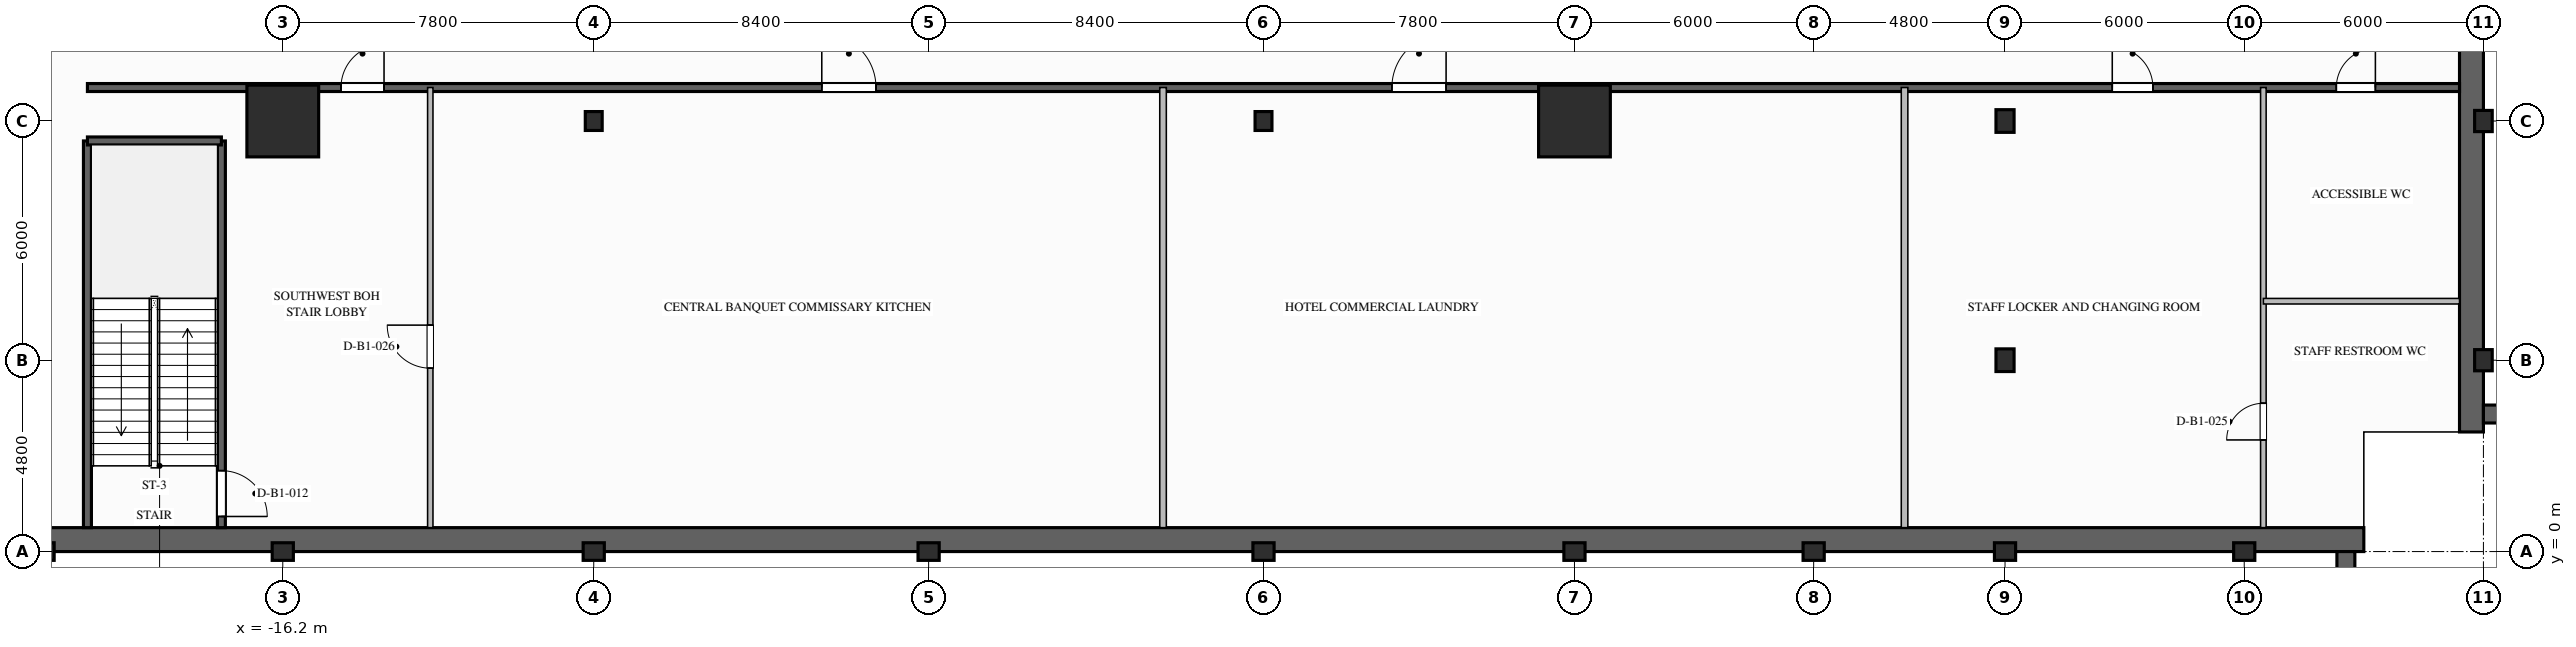
"""IFC4 building model, lengths in metres.
Left out: names, types, materials, properties, quantities, classifications, styles, units other than length and angle.
Written with IfcOpenShell. Run it as: python <this file> out.ifc"""

import sys

from ifc_helpers import new_model, si_unit, direction, frame, frame_2d, origin, origin_2d, place, context, subcontext, project, spatial, rectangle, i_section, extrude, element, fill, save


model = new_model("IFC4")
c1 = context("Model", 3, precision=1e-05, world=origin(), true_north=direction((0.0, 1.0)))
c2 = subcontext(c1, "Body", "Model", "MODEL_VIEW")
j1 = project(units=[si_unit("LENGTHUNIT", "METRE"), si_unit("PLANEANGLEUNIT", "RADIAN")], contexts=[c1])
p1 = place(None, origin())
s1 = spatial("IfcSite", under=j1, at=p1, CompositionType="ELEMENT")
p2 = place(p1, origin())
s2 = spatial("IfcBuilding", under=s1, at=p2, CompositionType="ELEMENT")
p3 = place(p2, frame((0.0, 0.0, -5.4)))
s3 = spatial("IfcBuildingStorey", under=s2, at=p3, CompositionType="ELEMENT", Elevation=-5.4)
p4 = place(p3, frame((38.7, 51.0, 0.0), z_axis=(0.0, 0.0, 1.0), x_axis=(0.0, -1.0, 0.0)))
e1 = element("IfcWall", 1, at=p4, inside=s3, PredefinedType="USERDEFINED", context=c2, shape_type="SweptSolid", body=[
    extrude(rectangle(XDim=48.0, YDim=0.6, at=frame_2d((24.0, 0.0))), origin(), (0.0, 0.0, 1.0), 5.05),
])
p5 = place(p3, frame((36.0, 0.3, 0.0), z_axis=(0.0, 0.0, 1.0), x_axis=(-1.0, 0.0, 0.0)))
e2 = element("IfcWall", 2, at=p5, inside=s3, PredefinedType="USERDEFINED", context=c2, shape_type="SweptSolid", body=[
    extrude(rectangle(XDim=60.0, YDim=0.6, at=frame_2d((30.0, 0.0))), origin(), (0.0, 0.0, 1.0), 5.05),
])
for number, where, z_axis, x_axis in (
    (3, (-16.2, 10.8, 0.0), (0.0, 0.0, 1.0), (1.0, 0.0, 0.0)),
    (4, (16.2, 10.8, 0.0), (0.0, 0.0, 1.0), (1.0, 0.0, 0.0)),
):
    element("IfcColumn", number, at=place(p3, frame(where, z_axis=z_axis, x_axis=x_axis)), inside=s3, PredefinedType="COLUMN", context=c2, shape_type="SweptSolid", body=[
        extrude(rectangle(XDim=1.8, YDim=1.8, at=origin_2d()), origin(), (0.0, 0.0, 1.0), 5.4),
    ])
for number, where, z_axis, x_axis in (
    (5, (39.0, 4.8, 0.0), (0.0, 0.0, 1.0), (1.0, 0.0, 0.0)),
    (6, (39.0, 10.8, 0.0), (0.0, 0.0, 1.0), (1.0, 0.0, 0.0)),
    (7, (-22.2, 0.0, 0.0), (0.0, 0.0, 1.0), (0.0, 1.0, 0.0)),
    (8, (-16.2, 0.0, 0.0), (0.0, 0.0, 1.0), (0.0, 1.0, 0.0)),
    (9, (-8.4, 0.0, 0.0), (0.0, 0.0, 1.0), (0.0, 1.0, 0.0)),
    (10, (0.0, 0.0, 0.0), (0.0, 0.0, 1.0), (0.0, 1.0, 0.0)),
    (11, (8.4, 0.0, 0.0), (0.0, 0.0, 1.0), (0.0, 1.0, 0.0)),
    (12, (16.2, 0.0, 0.0), (0.0, 0.0, 1.0), (0.0, 1.0, 0.0)),
    (13, (22.2, 0.0, 0.0), (0.0, 0.0, 1.0), (0.0, 1.0, 0.0)),
    (14, (27.0, 0.0, 0.0), (0.0, 0.0, 1.0), (0.0, 1.0, 0.0)),
    (15, (33.0, 0.0, 0.0), (0.0, 0.0, 1.0), (0.0, 1.0, 0.0)),
):
    element("IfcColumn", number, at=place(p3, frame(where, z_axis=z_axis, x_axis=x_axis)), inside=s3, PredefinedType="COLUMN", context=c2, shape_type="SweptSolid", body=[
        extrude(i_section(OverallWidth=0.442, OverallDepth=0.531, WebThickness=0.066, FlangeThickness=0.106, FilletRadius=0.03, at=origin_2d()), origin(), (0.0, 0.0, 1.0), 5.4),
    ])
for number, where, z_axis, x_axis in (
    (16, (27.0, 4.8, 0.0), (0.0, 0.0, 1.0), (1.0, 0.0, 0.0)),
    (17, (27.0, 10.8, 0.0), (0.0, 0.0, 1.0), (1.0, 0.0, 0.0)),
):
    element("IfcColumn", number, at=place(p3, frame(where, z_axis=z_axis, x_axis=x_axis)), inside=s3, PredefinedType="COLUMN", context=c2, shape_type="SweptSolid", body=[
        extrude(i_section(OverallWidth=0.454, OverallDepth=0.569, WebThickness=0.078, FlangeThickness=0.125, FilletRadius=0.03, at=origin_2d()), origin(), (0.0, 0.0, 1.0), 5.4),
    ])
for number, where, z_axis, x_axis in (
    (18, (-8.4, 10.8, 0.0), (0.0, 0.0, 1.0), (1.0, 0.0, 0.0)),
    (19, (8.4, 10.8, 0.0), (0.0, 0.0, 1.0), (1.0, 0.0, 0.0)),
):
    element("IfcColumn", number, at=place(p3, frame(where, z_axis=z_axis, x_axis=x_axis)), inside=s3, PredefinedType="COLUMN", context=c2, shape_type="SweptSolid", body=[
        extrude(i_section(OverallWidth=0.424, OverallDepth=0.474, WebThickness=0.048, FlangeThickness=0.077, FilletRadius=0.03, at=origin_2d()), origin(), (0.0, 0.0, 1.0), 5.4),
    ])
p6 = place(p3, frame((39.0, 3.45, -5.4), z_axis=(0.0, 0.0, 1.0), x_axis=(1.0, 0.0, 0.0)))
e20 = element("IfcWall", 20, at=p6, inside=s3, PredefinedType="USERDEFINED", context=c2, shape_type="SweptSolid", body=[
    extrude(rectangle(XDim=5.825, YDim=0.45, at=frame_2d((2.913, 0.0))), origin(), (0.0, 0.0, 1.0), 10.62),
])
p7 = place(p3, frame((35.55, -2.325, -5.4), z_axis=(0.0, 0.0, 1.0), x_axis=(0.0, 1.0, 0.0)))
e21 = element("IfcWall", 21, at=p7, inside=s3, PredefinedType="USERDEFINED", context=c2, shape_type="SweptSolid", body=[
    extrude(rectangle(XDim=2.325, YDim=0.45, at=frame_2d((1.163, 0.0))), origin(), (0.0, 0.0, 1.0), 10.62),
])
p8 = place(p3, frame((-21.1, 0.6, 0.0), z_axis=(0.0, 0.0, 1.0), x_axis=(0.0, 1.0, 0.0)))
e22 = element("IfcWall", 22, at=p8, inside=s3, PredefinedType="SOLIDWALL", context=c2, shape_type="SweptSolid", body=[
    extrude(rectangle(XDim=9.7, YDim=0.2, at=frame_2d((4.85, 0.0))), origin(), (0.0, 0.0, 1.0), 5.05),
])
p9 = place(p3, frame((-17.74, 10.3, 0.0), z_axis=(0.0, 0.0, 1.0), x_axis=(0.0, -1.0, 0.0)))
e23 = element("IfcWall", 23, at=p9, inside=s3, PredefinedType="SOLIDWALL", context=c2, shape_type="SweptSolid", body=[
    extrude(rectangle(XDim=9.7, YDim=0.2, at=frame_2d((4.85, 0.0))), origin(), (0.0, 0.0, 1.0), 5.05),
])
p10 = place(p9, frame((8.27, 0.0, 0.0)))
e24 = element("IfcOpeningElement", 24, at=p10, cuts=e23, PredefinedType="OPENING", context=c2, shape_type="SweptSolid", body=[
    extrude(rectangle(XDim=1.15, YDim=2.15, at=frame_2d((0.575, 1.075))), frame((0.0, 0.11, 0.0), z_axis=(0.0, -1.0, 0.0), x_axis=(1.0, 0.0, 0.0)), (0.0, 0.0, 1.0), 0.22),
])
p11 = place(p3, frame((-17.74, 10.3, 0.0), z_axis=(0.0, 0.0, 1.0), x_axis=(-1.0, 0.0, 0.0)))
e25 = element("IfcWall", 25, at=p11, inside=s3, PredefinedType="SOLIDWALL", context=c2, shape_type="SweptSolid", body=[
    extrude(rectangle(XDim=3.36, YDim=0.2, at=frame_2d((1.68, 0.0))), origin(), (0.0, 0.0, 1.0), 5.05),
])
p12 = place(p3, frame((-21.1, 11.64, 0.0), z_axis=(0.0, 0.0, 1.0), x_axis=(1.0, 0.0, 0.0)))
e26 = element("IfcWall", 26, at=p12, inside=s3, PredefinedType="SOLIDWALL", context=c2, shape_type="SweptSolid", body=[
    extrude(rectangle(XDim=59.5, YDim=0.2, at=frame_2d((29.75, 0.0))), origin(), (0.0, 0.0, 1.0), 5.05),
])
p13 = place(p12, frame((6.36, 0.0, 0.0)))
e27 = element("IfcOpeningElement", 27, at=p13, cuts=e26, PredefinedType="OPENING", context=c2, shape_type="SweptSolid", body=[
    extrude(rectangle(XDim=1.08, YDim=2.04, at=frame_2d((0.54, 1.02))), frame((0.0, 0.11, 0.0), z_axis=(0.0, -1.0, 0.0), x_axis=(1.0, 0.0, 0.0)), (0.0, 0.0, 1.0), 0.22),
])
p14 = place(p12, frame((18.42, 0.0, 0.0)))
e28 = element("IfcOpeningElement", 28, at=p14, cuts=e26, PredefinedType="OPENING", context=c2, shape_type="SweptSolid", body=[
    extrude(rectangle(XDim=1.36, YDim=2.2, at=frame_2d((0.68, 1.1))), frame((0.0, 0.11, 0.0), z_axis=(0.0, -1.0, 0.0), x_axis=(1.0, 0.0, 0.0)), (0.0, 0.0, 1.0), 0.22),
])
p15 = place(p12, frame((32.72, 0.0, 0.0)))
e29 = element("IfcOpeningElement", 29, at=p15, cuts=e26, PredefinedType="OPENING", context=c2, shape_type="SweptSolid", body=[
    extrude(rectangle(XDim=1.36, YDim=2.2, at=frame_2d((0.68, 1.1))), frame((0.0, 0.11, 0.0), z_axis=(0.0, -1.0, 0.0), x_axis=(1.0, 0.0, 0.0)), (0.0, 0.0, 1.0), 0.22),
])
p16 = place(p12, frame((50.79, 0.0, 0.0)))
e30 = element("IfcOpeningElement", 30, at=p16, cuts=e26, PredefinedType="OPENING", context=c2, shape_type="SweptSolid", body=[
    extrude(rectangle(XDim=1.02, YDim=2.15, at=frame_2d((0.51, 1.075))), frame((0.0, 0.11, 0.0), z_axis=(0.0, -1.0, 0.0), x_axis=(1.0, 0.0, 0.0)), (0.0, 0.0, 1.0), 0.22),
])
p17 = place(p12, frame((56.41, 0.0, 0.0)))
e31 = element("IfcOpeningElement", 31, at=p17, cuts=e26, PredefinedType="OPENING", context=c2, shape_type="SweptSolid", body=[
    extrude(rectangle(XDim=0.98, YDim=2.1, at=frame_2d((0.49, 1.05))), frame((0.0, 0.11, 0.0), z_axis=(0.0, -1.0, 0.0), x_axis=(1.0, 0.0, 0.0)), (0.0, 0.0, 1.0), 0.22),
])
p18 = place(p3, frame((-12.5, 0.6, 0.0), z_axis=(0.0, 0.0, 1.0), x_axis=(0.0, 1.0, 0.0)))
e32 = element("IfcWall", 32, at=p18, inside=s3, PredefinedType="PARTITIONING", context=c2, shape_type="SweptSolid", body=[
    extrude(rectangle(XDim=11.04, YDim=0.135, at=frame_2d((5.52, 0.0))), origin(), (0.0, 0.0, 1.0), 5.05),
])
p19 = place(p18, frame((4.0, 0.0, 0.0)))
e33 = element("IfcOpeningElement", 33, at=p19, cuts=e32, PredefinedType="OPENING", context=c2, shape_type="SweptSolid", body=[
    extrude(rectangle(XDim=1.08, YDim=2.04, at=frame_2d((0.54, 1.02))), frame((0.0, 0.077, 0.0), z_axis=(0.0, -1.0, 0.0), x_axis=(1.0, 0.0, 0.0)), (0.0, 0.0, 1.0), 0.155),
])
for number, where, z_axis, x_axis in (
    (34, (5.88, 0.6, 0.0), (0.0, 0.0, 1.0), (0.0, 1.0, 0.0)),
    (35, (24.48, 0.6, 0.0), (0.0, 0.0, 1.0), (0.0, 1.0, 0.0)),
):
    element("IfcWall", number, at=place(p3, frame(where, z_axis=z_axis, x_axis=x_axis)), inside=s3, PredefinedType="PARTITIONING", context=c2, shape_type="SweptSolid", body=[
        extrude(rectangle(XDim=11.04, YDim=0.165, at=frame_2d((5.52, 0.0))), origin(), (0.0, 0.0, 1.0), 5.05),
    ])
p20 = place(p3, frame((33.48, 0.6, 0.0), z_axis=(0.0, 0.0, 1.0), x_axis=(0.0, 1.0, 0.0)))
e36 = element("IfcWall", 36, at=p20, inside=s3, PredefinedType="PLUMBINGWALL", context=c2, shape_type="SweptSolid", body=[
    extrude(rectangle(XDim=11.04, YDim=0.14, at=frame_2d((5.52, 0.0))), origin(), (0.0, 0.0, 1.0), 5.05),
])
p21 = place(p20, frame((2.2, 0.0, 0.0)))
e37 = element("IfcOpeningElement", 37, at=p21, cuts=e36, PredefinedType="OPENING", context=c2, shape_type="SweptSolid", body=[
    extrude(rectangle(XDim=0.92, YDim=2.1, at=frame_2d((0.46, 1.05))), frame((0.0, 0.08, 0.0), z_axis=(0.0, -1.0, 0.0), x_axis=(1.0, 0.0, 0.0)), (0.0, 0.0, 1.0), 0.16),
])
p22 = place(p3, frame((33.48, 6.28, 0.0), z_axis=(0.0, 0.0, 1.0), x_axis=(1.0, 0.0, 0.0)))
e38 = element("IfcWall", 38, at=p22, inside=s3, PredefinedType="PLUMBINGWALL", context=c2, shape_type="SweptSolid", body=[
    extrude(rectangle(XDim=4.92, YDim=0.14, at=frame_2d((2.46, 0.0))), origin(), (0.0, 0.0, 1.0), 5.05),
])
p23 = place(p10, origin())
e39 = element("IfcDoor", 39, at=p23, inside=s3, OperationType="SINGLE_SWING_RIGHT", PredefinedType="DOOR", context=c2, shape_type="SweptSolid", body=[
    extrude(rectangle(XDim=1.15, YDim=2.15, at=frame_2d((0.575, 1.075))), frame((0.0, 0.025, 0.0), z_axis=(0.0, -1.0, 0.0), x_axis=(1.0, 0.0, 0.0)), (0.0, 0.0, 1.0), 0.05),
])
fill(e24, e39)
p24 = place(p13, origin())
e40 = element("IfcDoor", 40, at=p24, inside=s3, OperationType="SINGLE_SWING_RIGHT", PredefinedType="DOOR", context=c2, shape_type="SweptSolid", body=[
    extrude(rectangle(XDim=1.08, YDim=2.04, at=frame_2d((0.54, 1.02))), frame((0.0, 0.025, 0.0), z_axis=(0.0, -1.0, 0.0), x_axis=(1.0, 0.0, 0.0)), (0.0, 0.0, 1.0), 0.05),
])
fill(e27, e40)
p25 = place(p14, origin())
e41 = element("IfcDoor", 41, at=p25, inside=s3, OperationType="SINGLE_SWING_LEFT", PredefinedType="DOOR", context=c2, shape_type="SweptSolid", body=[
    extrude(rectangle(XDim=1.36, YDim=2.2, at=frame_2d((0.68, 1.1))), frame((0.0, 0.025, 0.0), z_axis=(0.0, -1.0, 0.0), x_axis=(1.0, 0.0, 0.0)), (0.0, 0.0, 1.0), 0.05),
])
fill(e28, e41)
p26 = place(p15, origin())
e42 = element("IfcDoor", 42, at=p26, inside=s3, OperationType="SINGLE_SWING_RIGHT", PredefinedType="DOOR", context=c2, shape_type="SweptSolid", body=[
    extrude(rectangle(XDim=1.36, YDim=2.2, at=frame_2d((0.68, 1.1))), frame((0.0, 0.025, 0.0), z_axis=(0.0, -1.0, 0.0), x_axis=(1.0, 0.0, 0.0)), (0.0, 0.0, 1.0), 0.05),
])
fill(e29, e42)
p27 = place(p16, origin())
e43 = element("IfcDoor", 43, at=p27, inside=s3, OperationType="SINGLE_SWING_LEFT", PredefinedType="DOOR", context=c2, shape_type="SweptSolid", body=[
    extrude(rectangle(XDim=1.02, YDim=2.15, at=frame_2d((0.51, 1.075))), frame((0.0, 0.025, 0.0), z_axis=(0.0, -1.0, 0.0), x_axis=(1.0, 0.0, 0.0)), (0.0, 0.0, 1.0), 0.05),
])
fill(e30, e43)
p28 = place(p17, origin())
e44 = element("IfcDoor", 44, at=p28, inside=s3, OperationType="SINGLE_SWING_RIGHT", PredefinedType="DOOR", context=c2, shape_type="SweptSolid", body=[
    extrude(rectangle(XDim=0.98, YDim=2.1, at=frame_2d((0.49, 1.05))), frame((0.0, 0.025, 0.0), z_axis=(0.0, -1.0, 0.0), x_axis=(1.0, 0.0, 0.0)), (0.0, 0.0, 1.0), 0.05),
])
fill(e31, e44)
p29 = place(p21, origin())
e45 = element("IfcDoor", 45, at=p29, inside=s3, OperationType="SINGLE_SWING_LEFT", PredefinedType="DOOR", context=c2, shape_type="SweptSolid", body=[
    extrude(rectangle(XDim=0.92, YDim=2.1, at=frame_2d((0.46, 1.05))), frame((0.0, 0.025, 0.0), z_axis=(0.0, -1.0, 0.0), x_axis=(1.0, 0.0, 0.0)), (0.0, 0.0, 1.0), 0.05),
])
fill(e37, e45)
p30 = place(p19, origin())
e46 = element("IfcDoor", 46, at=p30, inside=s3, OperationType="SINGLE_SWING_RIGHT", PredefinedType="DOOR", context=c2, shape_type="SweptSolid", body=[
    extrude(rectangle(XDim=1.08, YDim=2.04, at=frame_2d((0.54, 1.02))), frame((0.0, 0.025, 0.0), z_axis=(0.0, -1.0, 0.0), x_axis=(1.0, 0.0, 0.0)), (0.0, 0.0, 1.0), 0.05),
])
fill(e33, e46)
save(model, sys.argv[1])
